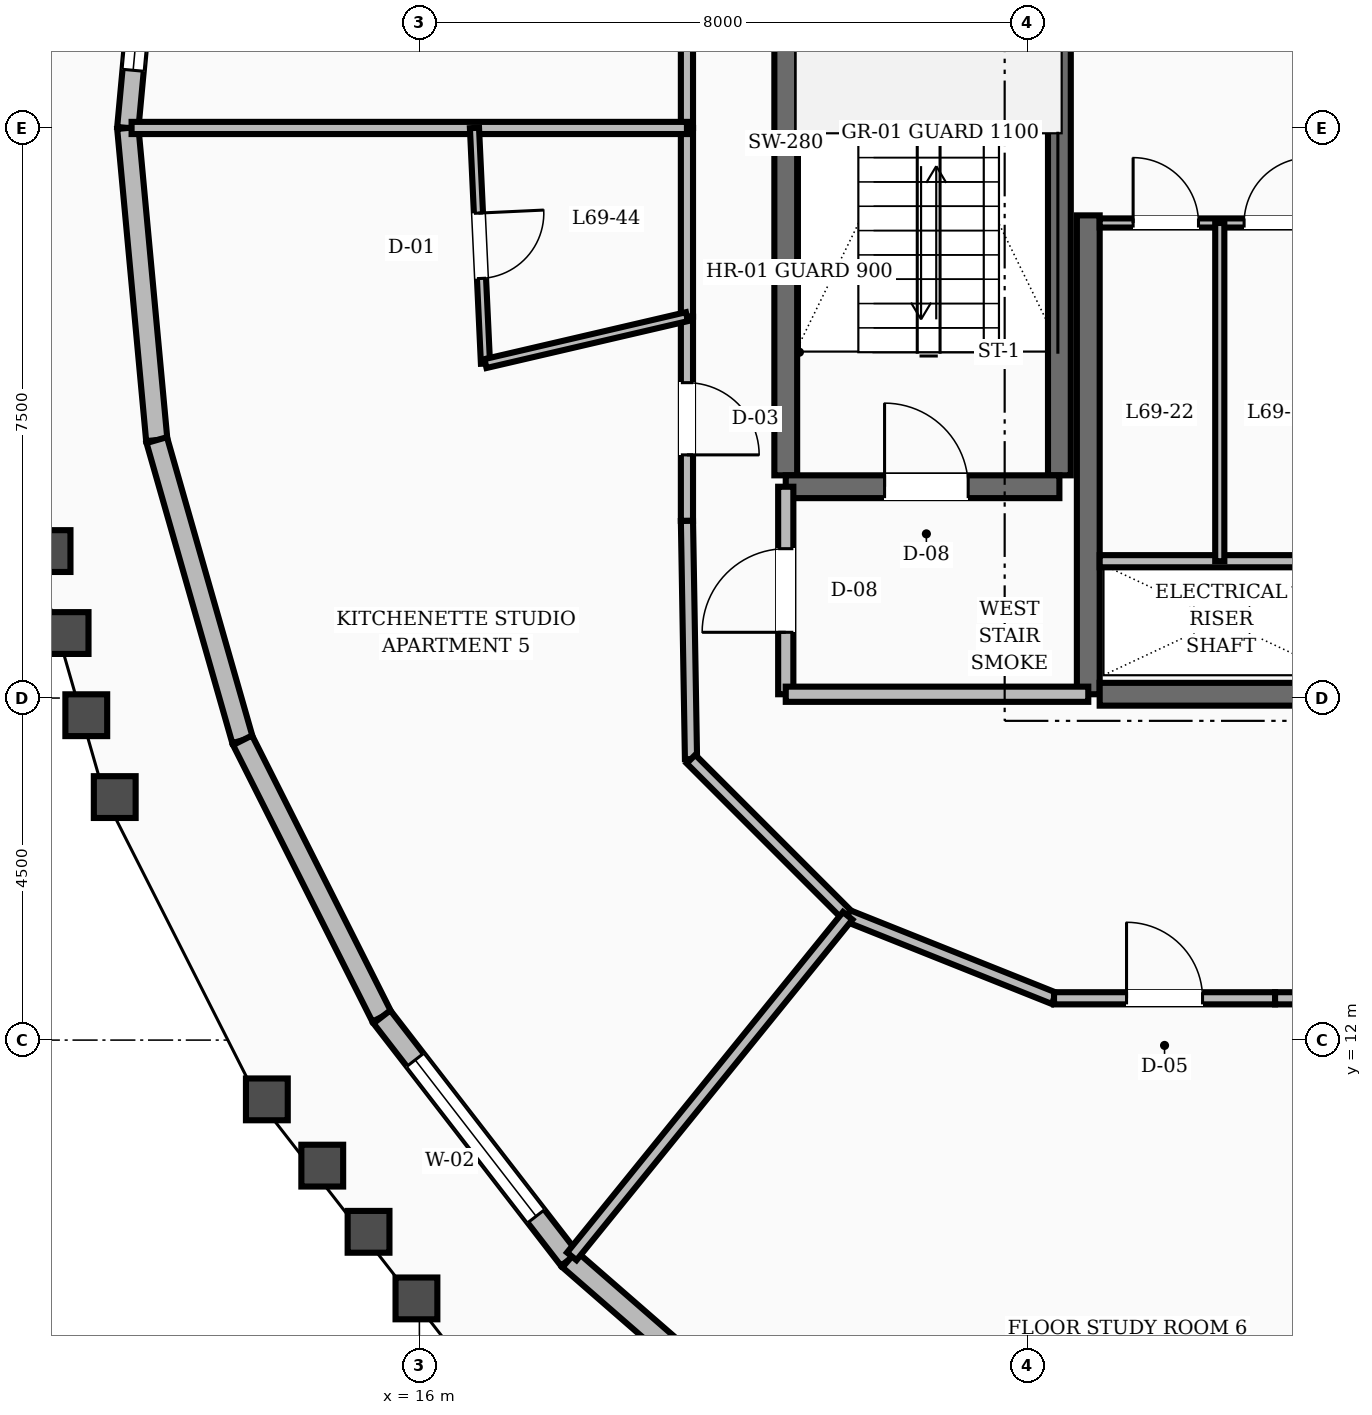
"""IFC4 building model, lengths in metres.
Left out: names, types, materials, properties, quantities, classifications, styles, units other than length and angle.
Written with IfcOpenShell. Run it as: python <this file> out.ifc"""

import sys

from ifc_helpers import new_model, si_unit, direction, frame, frame_2d, origin, place, context, subcontext, project, spatial, rectangle, extrude, element, fill, save


model = new_model("IFC4")
c1 = context("Model", 3, precision=1e-05, world=origin(), true_north=direction((0.0, 1.0)))
c2 = subcontext(c1, "Body", "Model", "MODEL_VIEW")
j1 = project(units=[si_unit("LENGTHUNIT", "METRE"), si_unit("PLANEANGLEUNIT", "RADIAN")], contexts=[c1])
p1 = place(None, origin())
s1 = spatial("IfcSite", under=j1, at=p1, CompositionType="ELEMENT")
p2 = place(p1, origin())
s2 = spatial("IfcBuilding", under=s1, at=p2, CompositionType="ELEMENT")
p3 = place(p2, frame((0.0, 0.0, 265.2)))
s3 = spatial("IfcBuildingStorey", under=s2, at=p3, CompositionType="ELEMENT", Elevation=265.2)
p4 = place(p3, frame((24.8, 16.55, 0.0), z_axis=(0.0, 0.0, 1.0), x_axis=(0.0, 1.0, 0.0)))
e1 = element("IfcWall", 1, at=p4, inside=s3, PredefinedType="SHEAR", context=c2, shape_type="SweptSolid", body=[
    extrude(rectangle(XDim=6.3, YDim=0.3, at=frame_2d((3.15, 0.0))), origin(), (0.0, 0.0, 1.0), 3.6),
])
p5 = place(p3, frame((24.95, 16.55, 0.0), z_axis=(0.0, 0.0, 1.0), x_axis=(1.0, 0.0, 0.0)))
e2 = element("IfcWall", 2, at=p5, inside=s3, PredefinedType="SHEAR", context=c2, shape_type="SweptSolid", body=[
    extrude(rectangle(XDim=3.25, YDim=0.3, at=frame_2d((1.625, 0.0))), origin(), (0.0, 0.0, 1.0), 3.6),
])
for number, where, z_axis, x_axis in (
    (3, (20.82, 19.43, 0.0), (0.0, 0.0, 1.0), (0.0, 1.0, 0.0)),
    (4, (24.42, 19.43, 0.0), (0.0, 0.0, 1.0), (0.0, 1.0, 0.0)),
):
    element("IfcWall", number, at=place(p3, frame(where, z_axis=z_axis, x_axis=x_axis)), inside=s3, PredefinedType="SHEAR", context=c2, shape_type="SweptSolid", body=[
        extrude(rectangle(XDim=8.74, YDim=0.3, at=frame_2d((4.37, 0.0))), origin(), (0.0, 0.0, 1.0), 3.6),
    ])
p6 = place(p3, frame((20.82, 19.28, 0.0), z_axis=(0.0, 0.0, 1.0), x_axis=(1.0, 0.0, 0.0)))
e5 = element("IfcWall", 5, at=p6, inside=s3, PredefinedType="SHEAR", context=c2, shape_type="SweptSolid", body=[
    extrude(rectangle(XDim=3.6, YDim=0.3, at=frame_2d((1.8, 0.0))), origin(), (0.0, 0.0, 1.0), 3.6),
])
p7 = place(p6, frame((1.3, 0.0, 0.0)))
e6 = element("IfcOpeningElement", 6, at=p7, cuts=e5, PredefinedType="OPENING", context=c2, shape_type="SweptSolid", body=[
    extrude(rectangle(XDim=1.1, YDim=2.1, at=frame_2d((0.55, 1.05))), frame((0.0, 0.16, 0.0), z_axis=(0.0, -1.0, 0.0), x_axis=(1.0, 0.0, 0.0)), (0.0, 0.0, 1.0), 0.32),
])
p8 = place(p3, frame((12.545, 28.106, 0.0), z_axis=(0.0, 0.0, 1.0), x_axis=(-0.092467769865, -0.995715678061, 0.0)))
e7 = element("IfcWall", 7, at=p8, inside=s3, PredefinedType="STANDARD", context=c2, shape_type="SweptSolid", body=[
    extrude(rectangle(XDim=4.124, YDim=0.28, at=frame_2d((2.062, 0.0))), origin(), (0.0, 0.0, 1.0), 2.88),
])
p9 = place(p8, frame((0.762, 0.0, 0.8)))
e8 = element("IfcOpeningElement", 8, at=p9, cuts=e7, PredefinedType="OPENING", context=c2, shape_type="SweptSolid", body=[
    extrude(rectangle(XDim=2.6, YDim=1.65, at=frame_2d((1.3, 0.825))), frame((0.0, 0.15, 0.0), z_axis=(0.0, -1.0, 0.0), x_axis=(1.0, 0.0, 0.0)), (0.0, 0.0, 1.0), 0.3),
])
p10 = place(p3, frame((12.164, 24.0, 0.0), z_axis=(0.0, 0.0, 1.0), x_axis=(0.092467769865, -0.995715678061, 0.0)))
e9 = element("IfcWall", 9, at=p10, inside=s3, PredefinedType="STANDARD", context=c2, shape_type="SweptSolid", body=[
    extrude(rectangle(XDim=4.124, YDim=0.28, at=frame_2d((2.062, 0.0))), origin(), (0.0, 0.0, 1.0), 2.88),
])
p11 = place(p3, frame((12.545, 19.894, 0.0), z_axis=(0.0, 0.0, 1.0), x_axis=(0.274823195621, -0.961494779574, 0.0)))
e10 = element("IfcWall", 10, at=p11, inside=s3, PredefinedType="STANDARD", context=c2, shape_type="SweptSolid", body=[
    extrude(rectangle(XDim=4.107, YDim=0.28, at=frame_2d((2.053, 0.0))), origin(), (0.0, 0.0, 1.0), 2.88),
])
p12 = place(p3, frame((13.674, 15.945, 0.0), z_axis=(0.0, 0.0, 1.0), x_axis=(0.449847948813, -0.893105157833, 0.0)))
e11 = element("IfcWall", 11, at=p12, inside=s3, PredefinedType="STANDARD", context=c2, shape_type="SweptSolid", body=[
    extrude(rectangle(XDim=4.075, YDim=0.28, at=frame_2d((2.037, 0.0))), origin(), (0.0, 0.0, 1.0), 2.88),
])
p13 = place(p3, frame((15.507, 12.306, 0.0), z_axis=(0.0, 0.0, 1.0), x_axis=(0.611762796107, -0.791041263968, 0.0)))
e12 = element("IfcWall", 12, at=p13, inside=s3, PredefinedType="STANDARD", context=c2, shape_type="SweptSolid", body=[
    extrude(rectangle(XDim=4.032, YDim=0.28, at=frame_2d((2.016, 0.0))), origin(), (0.0, 0.0, 1.0), 2.88),
])
p14 = place(p13, frame((0.716, 0.0, 0.8)))
e13 = element("IfcOpeningElement", 13, at=p14, cuts=e12, PredefinedType="OPENING", context=c2, shape_type="SweptSolid", body=[
    extrude(rectangle(XDim=2.6, YDim=1.65, at=frame_2d((1.3, 0.825))), frame((0.0, 0.15, 0.0), z_axis=(0.0, -1.0, 0.0), x_axis=(1.0, 0.0, 0.0)), (0.0, 0.0, 1.0), 0.3),
])
p15 = place(p3, frame((17.973, 9.116, 0.0), z_axis=(0.0, 0.0, 1.0), x_axis=(0.75414910989, -0.656703220681, 0.0)))
e14 = element("IfcWall", 14, at=p15, inside=s3, PredefinedType="STANDARD", context=c2, shape_type="SweptSolid", body=[
    extrude(rectangle(XDim=3.986, YDim=0.28, at=frame_2d((1.993, 0.0))), origin(), (0.0, 0.0, 1.0), 2.88),
])
p16 = place(p3, frame((20.82, 16.55, 0.0), z_axis=(0.0, 0.0, 1.0), x_axis=(0.0, 1.0, 0.0)))
e15 = element("IfcWall", 15, at=p16, inside=s3, PredefinedType="SOLIDWALL", context=c2, shape_type="SweptSolid", body=[
    extrude(rectangle(XDim=2.73, YDim=0.2, at=frame_2d((1.365, 0.0))), origin(), (0.0, 0.0, 1.0), 2.87),
])
p17 = place(p16, frame((0.815, 0.0, 0.0)))
e16 = element("IfcOpeningElement", 16, at=p17, cuts=e15, PredefinedType="OPENING", context=c2, shape_type="SweptSolid", body=[
    extrude(rectangle(XDim=1.1, YDim=2.1, at=frame_2d((0.55, 1.05))), frame((0.0, 0.11, 0.0), z_axis=(0.0, -1.0, 0.0), x_axis=(1.0, 0.0, 0.0)), (0.0, 0.0, 1.0), 0.22),
])
p18 = place(p3, frame((20.82, 16.55, 0.0), z_axis=(0.0, 0.0, 1.0), x_axis=(1.0, 0.0, 0.0)))
e17 = element("IfcWall", 17, at=p18, inside=s3, PredefinedType="SOLIDWALL", context=c2, shape_type="SweptSolid", body=[
    extrude(rectangle(XDim=3.98, YDim=0.2, at=frame_2d((1.99, 0.0))), origin(), (0.0, 0.0, 1.0), 2.87),
])
p19 = place(p3, frame((24.95, 18.3, 0.0), z_axis=(0.0, 0.0, 1.0), x_axis=(1.0, 0.0, 0.0)))
e18 = element("IfcWall", 18, at=p19, inside=s3, PredefinedType="SOLIDWALL", context=c2, shape_type="SweptSolid", body=[
    extrude(rectangle(XDim=3.2, YDim=0.16, at=frame_2d((1.6, 0.0))), origin(), (0.0, 0.0, 1.0), 2.87),
])
p20 = place(p3, frame((24.95, 22.75, 0.0), z_axis=(0.0, 0.0, 1.0), x_axis=(1.0, 0.0, 0.0)))
e19 = element("IfcWall", 19, at=p20, inside=s3, PredefinedType="PARTITIONING", context=c2, shape_type="SweptSolid", body=[
    extrude(rectangle(XDim=3.2, YDim=0.12, at=frame_2d((1.6, 0.0))), origin(), (0.0, 0.0, 1.0), 2.87),
])
p21 = place(p20, frame((0.44, 0.0, 0.0)))
e20 = element("IfcOpeningElement", 20, at=p21, cuts=e19, PredefinedType="OPENING", context=c2, shape_type="SweptSolid", body=[
    extrude(rectangle(XDim=0.86, YDim=2.1, at=frame_2d((0.43, 1.05))), frame((0.0, 0.07, 0.0), z_axis=(0.0, -1.0, 0.0), x_axis=(1.0, 0.0, 0.0)), (0.0, 0.0, 1.0), 0.14),
])
p22 = place(p20, frame((1.9, 0.0, 0.0)))
e21 = element("IfcOpeningElement", 21, at=p22, cuts=e19, PredefinedType="OPENING", context=c2, shape_type="SweptSolid", body=[
    extrude(rectangle(XDim=0.86, YDim=2.1, at=frame_2d((0.43, 1.05))), frame((0.0, 0.07, 0.0), z_axis=(0.0, -1.0, 0.0), x_axis=(1.0, 0.0, 0.0)), (0.0, 0.0, 1.0), 0.14),
])
p23 = place(p3, frame((26.53, 18.3, 0.0), z_axis=(0.0, 0.0, 1.0), x_axis=(0.0, 1.0, 0.0)))
e22 = element("IfcWall", 22, at=p23, inside=s3, PredefinedType="PARTITIONING", context=c2, shape_type="SweptSolid", body=[
    extrude(rectangle(XDim=4.45, YDim=0.12, at=frame_2d((2.225, 0.0))), origin(), (0.0, 0.0, 1.0), 2.87),
])
for number, where, z_axis, x_axis in (
    (23, (19.52, 26.482, 0.0), (0.0, 0.0, 1.0), (0.0, -1.0, 0.0)),
    (24, (19.52, 24.0, 0.0), (0.0, 0.0, 1.0), (0.0, -1.0, 0.0)),
):
    element("IfcWall", number, at=place(p3, frame(where, z_axis=z_axis, x_axis=x_axis)), inside=s3, PredefinedType="SOLIDWALL", context=c2, shape_type="SweptSolid", body=[
        extrude(rectangle(XDim=2.482, YDim=0.16, at=frame_2d((1.241, 0.0))), origin(), (0.0, 0.0, 1.0), 2.87),
    ])
p24 = place(p3, frame((19.52, 21.518, 0.0), z_axis=(0.0, 0.0, 1.0), x_axis=(0.0, -1.0, 0.0)))
e25 = element("IfcWall", 25, at=p24, inside=s3, PredefinedType="SOLIDWALL", context=c2, shape_type="SweptSolid", body=[
    extrude(rectangle(XDim=2.687, YDim=0.16, at=frame_2d((1.344, 0.0))), origin(), (0.0, 0.0, 1.0), 2.87),
])
p25 = place(p24, frame((0.868, 0.0, 0.0)))
e26 = element("IfcOpeningElement", 26, at=p25, cuts=e25, PredefinedType="OPENING", context=c2, shape_type="SweptSolid", body=[
    extrude(rectangle(XDim=0.95, YDim=2.1, at=frame_2d((0.475, 1.05))), frame((0.0, 0.09, 0.0), z_axis=(0.0, -1.0, 0.0), x_axis=(1.0, 0.0, 0.0)), (0.0, 0.0, 1.0), 0.18),
])
p26 = place(p3, frame((19.52, 18.831, 0.0), z_axis=(0.0, 0.0, 1.0), x_axis=(0.016981035134, -0.999855811828, 0.0)))
e27 = element("IfcWall", 27, at=p26, inside=s3, PredefinedType="SOLIDWALL", context=c2, shape_type="SweptSolid", body=[
    extrude(rectangle(XDim=3.134, YDim=0.16, at=frame_2d((1.567, 0.0))), origin(), (0.0, 0.0, 1.0), 2.87),
])
p27 = place(p3, frame((19.573, 15.697, 0.0), z_axis=(0.0, 0.0, 1.0), x_axis=(0.707106781187, -0.707106781187, 0.0)))
e28 = element("IfcWall", 28, at=p27, inside=s3, PredefinedType="SOLIDWALL", context=c2, shape_type="SweptSolid", body=[
    extrude(rectangle(XDim=2.916, YDim=0.16, at=frame_2d((1.458, 0.0))), origin(), (0.0, 0.0, 1.0), 2.87),
])
p28 = place(p3, frame((21.635, 13.635, 0.0), z_axis=(0.0, 0.0, 1.0), x_axis=(0.92856882165, -0.371160266542, 0.0)))
e29 = element("IfcWall", 29, at=p28, inside=s3, PredefinedType="SOLIDWALL", context=c2, shape_type="SweptSolid", body=[
    extrude(rectangle(XDim=2.923, YDim=0.16, at=frame_2d((1.461, 0.0))), origin(), (0.0, 0.0, 1.0), 2.87),
])
p29 = place(p3, frame((24.349, 12.55, 0.0), z_axis=(0.0, 0.0, 1.0), x_axis=(1.0, 0.0, 0.0)))
e30 = element("IfcWall", 30, at=p29, inside=s3, PredefinedType="SOLIDWALL", context=c2, shape_type="SweptSolid", body=[
    extrude(rectangle(XDim=2.908, YDim=0.16, at=frame_2d((1.454, 0.0))), origin(), (0.0, 0.0, 1.0), 2.87),
])
p30 = place(p29, frame((0.954, 0.0, 0.0)))
e31 = element("IfcOpeningElement", 31, at=p30, cuts=e30, PredefinedType="OPENING", context=c2, shape_type="SweptSolid", body=[
    extrude(rectangle(XDim=1.0, YDim=2.1, at=frame_2d((0.5, 1.05))), frame((0.0, 0.09, 0.0), z_axis=(0.0, -1.0, 0.0), x_axis=(1.0, 0.0, 0.0)), (0.0, 0.0, 1.0), 0.18),
])
p31 = place(p3, frame((27.257, 12.55, 0.0), z_axis=(0.0, 0.0, 1.0), x_axis=(1.0, 0.0, 0.0)))
e32 = element("IfcWall", 32, at=p31, inside=s3, PredefinedType="SOLIDWALL", context=c2, shape_type="SweptSolid", body=[
    extrude(rectangle(XDim=2.465, YDim=0.16, at=frame_2d((1.232, 0.0))), origin(), (0.0, 0.0, 1.0), 2.87),
])
p32 = place(p3, frame((19.52, 24.0, 0.0), z_axis=(0.0, 0.0, 1.0), x_axis=(-1.0, 0.0, 0.0)))
e33 = element("IfcWall", 33, at=p32, inside=s3, PredefinedType="SOLIDWALL", context=c2, shape_type="SweptSolid", body=[
    extrude(rectangle(XDim=7.306, YDim=0.16, at=frame_2d((3.653, 0.0))), origin(), (0.0, 0.0, 1.0), 2.87),
])
p33 = place(p3, frame((16.725, 24.0, 0.0), z_axis=(0.0, 0.0, 1.0), x_axis=(0.046656758932, -0.998910980441, 0.0)))
e34 = element("IfcWall", 34, at=p33, inside=s3, PredefinedType="PARTITIONING", context=c2, shape_type="SweptSolid", body=[
    extrude(rectangle(XDim=3.103, YDim=0.12, at=frame_2d((1.552, 0.0))), origin(), (0.0, 0.0, 1.0), 2.87),
])
p34 = place(p33, frame((1.122, 0.0, 0.0)))
e35 = element("IfcOpeningElement", 35, at=p34, cuts=e34, PredefinedType="OPENING", context=c2, shape_type="SweptSolid", body=[
    extrude(rectangle(XDim=0.86, YDim=2.1, at=frame_2d((0.43, 1.05))), frame((0.0, 0.07, 0.0), z_axis=(0.0, -1.0, 0.0), x_axis=(1.0, 0.0, 0.0)), (0.0, 0.0, 1.0), 0.14),
])
p35 = place(p3, frame((19.52, 21.518, 0.0), z_axis=(0.0, 0.0, 1.0), x_axis=(-0.973946314658, -0.226778694248, 0.0)))
e36 = element("IfcWall", 36, at=p35, inside=s3, PredefinedType="PARTITIONING", context=c2, shape_type="SweptSolid", body=[
    extrude(rectangle(XDim=2.721, YDim=0.12, at=frame_2d((1.361, 0.0))), origin(), (0.0, 0.0, 1.0), 2.87),
])
p36 = place(p3, frame((21.635, 13.635, 0.0), z_axis=(0.0, 0.0, 1.0), x_axis=(-0.629541636782, -0.776966748039, 0.0)))
e37 = element("IfcWall", 37, at=p36, inside=s3, PredefinedType="SOLIDWALL", context=c2, shape_type="SweptSolid", body=[
    extrude(rectangle(XDim=5.766, YDim=0.16, at=frame_2d((2.883, 0.0))), origin(), (0.0, 0.0, 1.0), 2.87),
])
p37 = place(p9, origin())
e38 = element("IfcWindow", 38, at=p37, inside=s3, PartitioningType="SINGLE_PANEL", PredefinedType="WINDOW", context=c2, shape_type="SweptSolid", body=[
    extrude(rectangle(XDim=2.6, YDim=1.65, at=frame_2d((1.3, 0.825))), frame((0.0, 0.03, 0.0), z_axis=(0.0, -1.0, 0.0), x_axis=(1.0, 0.0, 0.0)), (0.0, 0.0, 1.0), 0.06),
])
fill(e8, e38)
p38 = place(p14, origin())
e39 = element("IfcWindow", 39, at=p38, inside=s3, PartitioningType="SINGLE_PANEL", PredefinedType="WINDOW", context=c2, shape_type="SweptSolid", body=[
    extrude(rectangle(XDim=2.6, YDim=1.65, at=frame_2d((1.3, 0.825))), frame((0.0, 0.03, 0.0), z_axis=(0.0, -1.0, 0.0), x_axis=(1.0, 0.0, 0.0)), (0.0, 0.0, 1.0), 0.06),
])
fill(e13, e39)
p39 = place(p7, origin())
e40 = element("IfcDoor", 40, at=p39, inside=s3, OperationType="SINGLE_SWING_LEFT", PredefinedType="DOOR", context=c2, shape_type="SweptSolid", body=[
    extrude(rectangle(XDim=1.1, YDim=2.1, at=frame_2d((0.55, 1.05))), frame((0.0, 0.025, 0.0), z_axis=(0.0, -1.0, 0.0), x_axis=(1.0, 0.0, 0.0)), (0.0, 0.0, 1.0), 0.05),
])
fill(e6, e40)
p40 = place(p17, origin())
e41 = element("IfcDoor", 41, at=p40, inside=s3, OperationType="SINGLE_SWING_LEFT", PredefinedType="DOOR", context=c2, shape_type="SweptSolid", body=[
    extrude(rectangle(XDim=1.1, YDim=2.1, at=frame_2d((0.55, 1.05))), frame((0.0, 0.025, 0.0), z_axis=(0.0, -1.0, 0.0), x_axis=(1.0, 0.0, 0.0)), (0.0, 0.0, 1.0), 0.05),
])
fill(e16, e41)
p41 = place(p21, origin())
e42 = element("IfcDoor", 42, at=p41, inside=s3, OperationType="SINGLE_SWING_LEFT", PredefinedType="DOOR", context=c2, shape_type="SweptSolid", body=[
    extrude(rectangle(XDim=0.86, YDim=2.1, at=frame_2d((0.43, 1.05))), frame((0.0, 0.025, 0.0), z_axis=(0.0, -1.0, 0.0), x_axis=(1.0, 0.0, 0.0)), (0.0, 0.0, 1.0), 0.05),
])
fill(e20, e42)
p42 = place(p22, origin())
e43 = element("IfcDoor", 43, at=p42, inside=s3, OperationType="SINGLE_SWING_RIGHT", PredefinedType="DOOR", context=c2, shape_type="SweptSolid", body=[
    extrude(rectangle(XDim=0.86, YDim=2.1, at=frame_2d((0.43, 1.05))), frame((0.0, 0.025, 0.0), z_axis=(0.0, -1.0, 0.0), x_axis=(1.0, 0.0, 0.0)), (0.0, 0.0, 1.0), 0.05),
])
fill(e21, e43)
p43 = place(p34, origin())
e44 = element("IfcDoor", 44, at=p43, inside=s3, OperationType="SINGLE_SWING_LEFT", PredefinedType="DOOR", context=c2, shape_type="SweptSolid", body=[
    extrude(rectangle(XDim=0.86, YDim=2.1, at=frame_2d((0.43, 1.05))), frame((0.0, 0.025, 0.0), z_axis=(0.0, -1.0, 0.0), x_axis=(1.0, 0.0, 0.0)), (0.0, 0.0, 1.0), 0.05),
])
fill(e35, e44)
p44 = place(p25, origin())
e45 = element("IfcDoor", 45, at=p44, inside=s3, OperationType="SINGLE_SWING_RIGHT", PredefinedType="DOOR", context=c2, shape_type="SweptSolid", body=[
    extrude(rectangle(XDim=0.95, YDim=2.1, at=frame_2d((0.475, 1.05))), frame((0.0, 0.025, 0.0), z_axis=(0.0, -1.0, 0.0), x_axis=(1.0, 0.0, 0.0)), (0.0, 0.0, 1.0), 0.05),
])
fill(e26, e45)
p45 = place(p30, origin())
e46 = element("IfcDoor", 46, at=p45, inside=s3, OperationType="SINGLE_SWING_LEFT", PredefinedType="DOOR", context=c2, shape_type="SweptSolid", body=[
    extrude(rectangle(XDim=1.0, YDim=2.1, at=frame_2d((0.5, 1.05))), frame((0.0, 0.025, 0.0), z_axis=(0.0, -1.0, 0.0), x_axis=(1.0, 0.0, 0.0)), (0.0, 0.0, 1.0), 0.05),
])
fill(e31, e46)
save(model, sys.argv[1])
